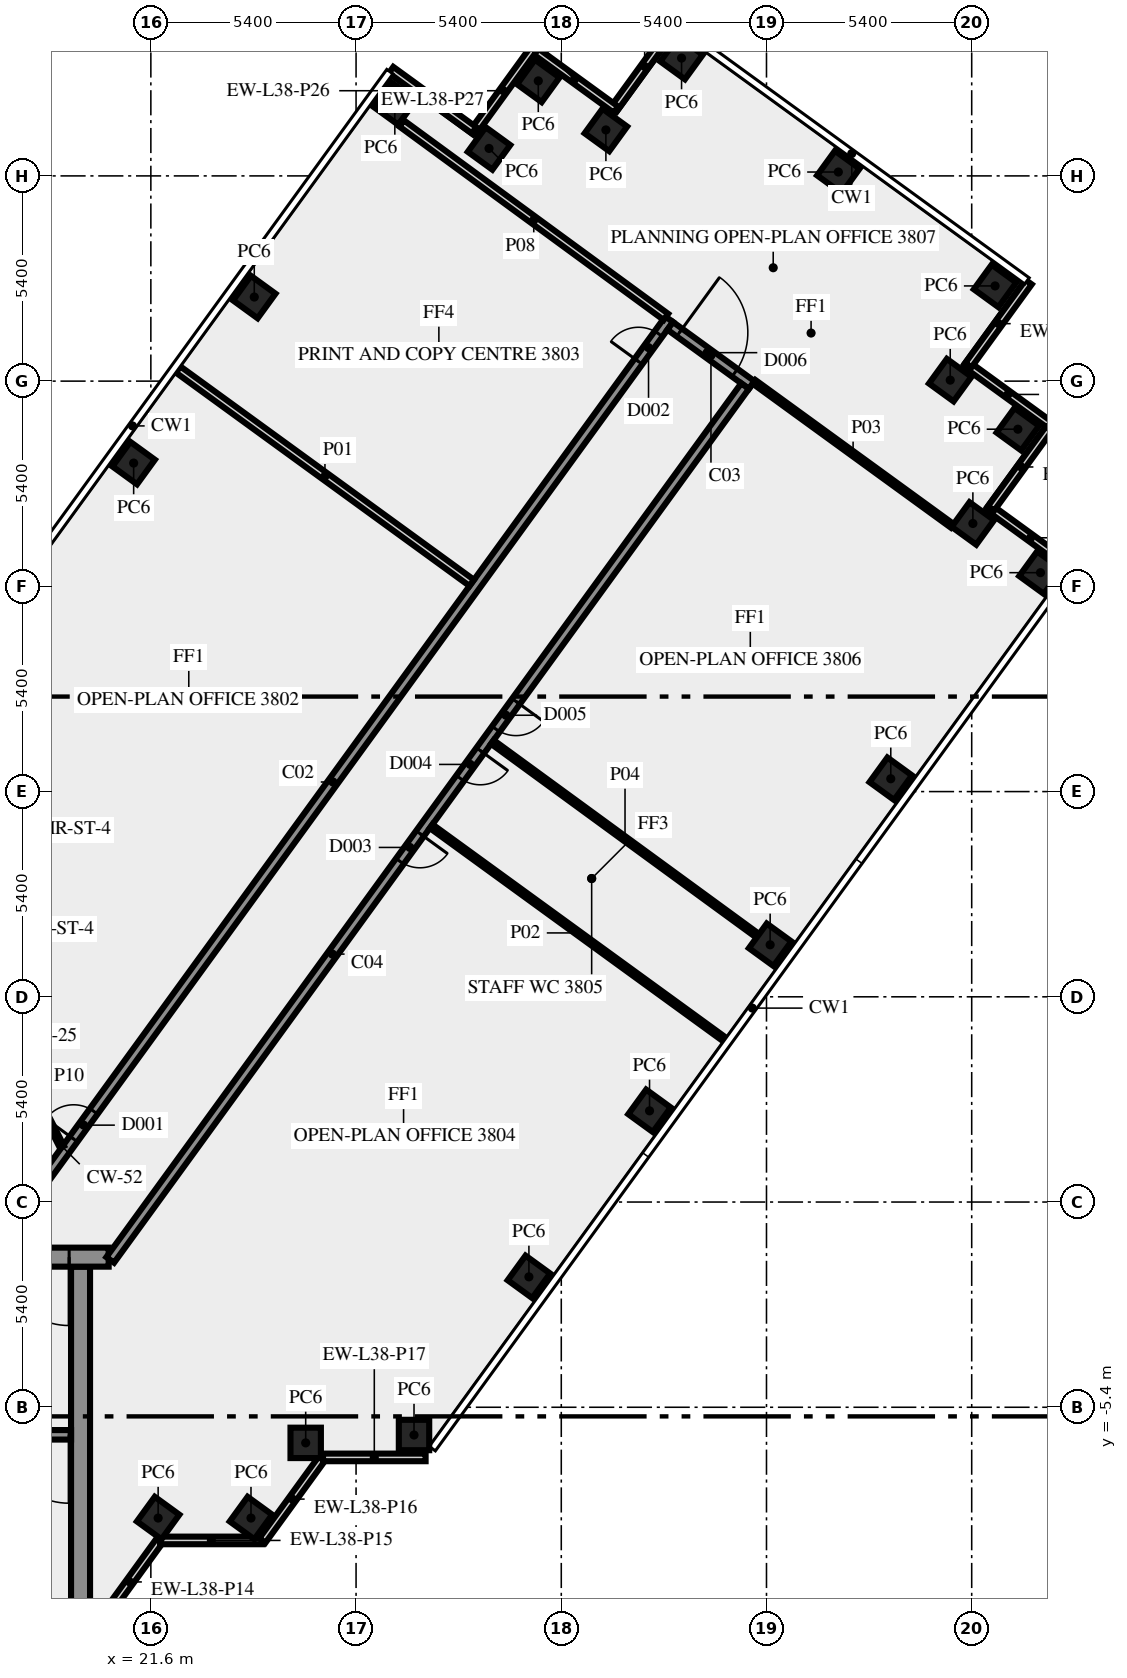
"""IFC4 building model, lengths in metres.
Left out: names, types, materials, properties, quantities, classifications, styles, units other than length and angle.
Written with IfcOpenShell. Run it as: python <this file> out.ifc"""

import sys

from ifc_helpers import new_model, si_unit, direction, frame, frame_2d, origin, origin_2d, place, context, subcontext, project, spatial, rectangle, extrude, element, fill, save


model = new_model("IFC4")
c1 = context("Model", 3, precision=1e-05, world=origin(), true_north=direction((0.0, 1.0)))
c2 = subcontext(c1, "Body", "Model", "MODEL_VIEW")
j1 = project(units=[si_unit("LENGTHUNIT", "METRE"), si_unit("PLANEANGLEUNIT", "RADIAN")], contexts=[c1])
p1 = place(None, origin())
s1 = spatial("IfcSite", under=j1, at=p1, CompositionType="ELEMENT")
p2 = place(p1, origin())
s2 = spatial("IfcBuilding", under=s1, at=p2, CompositionType="ELEMENT")
p3 = place(p2, frame((0.0, 0.0, 164.0)))
s3 = spatial("IfcBuildingStorey", under=s2, at=p3, CompositionType="ELEMENT", Elevation=164.0)
for number, where, z_axis, x_axis in (
    (1, (21.792, -8.315, 0.0), (0.0, 0.0, 1.0), (0.588, 0.809, 0.0)),
    (2, (24.235, -8.315, 0.0), (0.0, 0.0, 1.0), (0.588, 0.809, 0.0)),
    (3, (25.674, -6.337, 0.0), (0.0, 0.0, 1.0), (1.0, 0.0, 0.0)),
    (4, (28.525, -6.13, 0.0), (0.0, 0.0, 1.0), (1.0, 0.0, 0.0)),
    (5, (31.548, -1.969, 0.0), (0.0, 0.0, 1.0), (0.588, 0.809, 0.0)),
    (6, (34.722, 2.4, 0.0), (0.0, 0.0, 1.0), (0.588, 0.809, 0.0)),
    (7, (37.896, 6.769, 0.0), (0.0, 0.0, 1.0), (0.588, 0.809, 0.0)),
    (8, (41.07, 11.137, 0.0), (0.0, 0.0, 1.0), (0.588, 0.809, 0.0)),
    (9, (45.01, 16.56, 0.0), (0.0, 0.0, 1.0), (0.588, 0.809, 0.0)),
    (10, (43.231, 17.854, 0.0), (0.0, 0.0, 1.0), (0.588, 0.809, 0.0)),
    (11, (44.415, 20.335, 0.0), (0.0, 0.0, 1.0), (0.588, 0.809, 0.0)),
    (12, (42.635, 21.626, 0.0), (0.0, 0.0, 1.0), (-0.809, 0.588, 0.0)),
    (13, (43.815, 24.105, 0.0), (0.0, 0.0, 1.0), (-0.809, 0.588, 0.0)),
    (14, (39.691, 27.102, 0.0), (0.0, 0.0, 1.0), (-0.809, 0.588, 0.0)),
    (15, (35.565, 30.1, 0.0), (0.0, 0.0, 1.0), (-0.588, -0.809, 0.0)),
    (16, (33.574, 28.209, 0.0), (0.0, 0.0, 1.0), (-0.809, 0.588, 0.0)),
    (17, (31.795, 29.5, 0.0), (0.0, 0.0, 1.0), (-0.588, -0.809, 0.0)),
    (18, (30.499, 27.723, 0.0), (0.0, 0.0, 1.0), (-0.809, 0.588, 0.0)),
    (19, (28.02, 28.905, 0.0), (0.0, 0.0, 1.0), (-0.809, 0.588, 0.0)),
    (20, (24.321, 23.812, 0.0), (0.0, 0.0, 1.0), (-0.588, -0.809, 0.0)),
    (21, (21.147, 19.444, 0.0), (0.0, 0.0, 1.0), (-0.588, -0.809, 0.0)),
):
    element("IfcColumn", number, at=place(p3, frame(where, z_axis=z_axis, x_axis=x_axis)), inside=s3, PredefinedType="COLUMN", context=c2, shape_type="SweptSolid", body=[
        extrude(rectangle(XDim=0.8, YDim=0.8, at=origin_2d()), origin(), (0.0, 0.0, 1.0), 3.65),
    ])
p4 = place(p3, frame((20.253, -11.083, 0.0), z_axis=(0.0, 0.0, 1.0), x_axis=(0.587766567315, 0.809030569476, 0.0)))
e22 = element("IfcWall", 22, at=p4, inside=s3, PredefinedType="SOLIDWALL", context=c2, shape_type="SweptSolid", body=[
    extrude(rectangle(XDim=2.688, YDim=0.2, at=frame_2d((1.344, 0.0))), origin(), (0.0, 0.0, 1.0), 3.65),
])
p5 = place(p3, frame((21.843, -8.904, 0.0), z_axis=(0.0, 0.0, 1.0), x_axis=(1.0, 0.0, 0.0)))
e23 = element("IfcWall", 23, at=p5, inside=s3, PredefinedType="SOLIDWALL", context=c2, shape_type="SweptSolid", body=[
    extrude(rectangle(XDim=2.7, YDim=0.2, at=frame_2d((1.35, 0.0))), origin(), (0.0, 0.0, 1.0), 3.65),
])
p6 = place(p3, frame((24.533, -8.909, 0.0), z_axis=(0.0, 0.0, 1.0), x_axis=(0.587720002413, 0.809064397168, 0.0)))
e24 = element("IfcWall", 24, at=p6, inside=s3, PredefinedType="SOLIDWALL", context=c2, shape_type="SweptSolid", body=[
    extrude(rectangle(XDim=2.7, YDim=0.2, at=frame_2d((1.35, 0.0))), origin(), (0.0, 0.0, 1.0), 3.65),
])
for number, where, z_axis, x_axis in (
    (25, (26.13, -6.719, 0.0), (0.0, 0.0, 1.0), (1.0, 0.0, 0.0)),
    (26, (45.842, 16.685, 0.0), (0.0, 0.0, 1.0), (-0.809, 0.588, 0.0)),
    (27, (43.709, 18.249, 0.0), (0.0, 0.0, 1.0), (0.588, 0.809, 0.0)),
    (28, (45.245, 20.456, 0.0), (0.0, 0.0, 1.0), (-0.809, 0.588, 0.0)),
    (29, (43.113, 22.02, 0.0), (0.0, 0.0, 1.0), (0.588, 0.809, 0.0)),
    (30, (35.388, 30.97, 0.0), (0.0, 0.0, 1.0), (-0.588, -0.809, 0.0)),
    (31, (33.838, 28.744, 0.0), (0.0, 0.0, 1.0), (-0.809, 0.588, 0.0)),
    (32, (31.67, 30.333, 0.0), (0.0, 0.0, 1.0), (-0.588, -0.809, 0.0)),
    (33, (30.106, 28.2, 0.0), (0.0, 0.0, 1.0), (-0.809, 0.588, 0.0)),
):
    element("IfcWall", number, at=place(p3, frame(where, z_axis=z_axis, x_axis=x_axis)), inside=s3, PredefinedType="SOLIDWALL", context=c2, shape_type="SweptSolid", body=[
        extrude(rectangle(XDim=2.7, YDim=0.2, at=frame_2d((1.35, 0.0))), origin(), (0.0, 0.0, 1.0), 3.65),
    ])
p7 = place(p3, frame((19.75, -10.5, 0.0), z_axis=(0.0, 0.0, 1.0), x_axis=(0.0, 1.0, 0.0)))
e34 = element("IfcWall", 34, at=p7, inside=s3, PredefinedType="SHEAR", context=c2, shape_type="SweptSolid", body=[
    extrude(rectangle(XDim=8.8, YDim=0.5, at=frame_2d((4.4, 0.0))), origin(), (0.0, 0.0, 1.0), 3.65),
])
p8 = place(p3, frame((19.5, -6.125, 0.0), z_axis=(0.0, 0.0, 1.0), x_axis=(-1.0, 0.0, 0.0)))
e35 = element("IfcWall", 35, at=p8, inside=s3, PredefinedType="SHEAR", context=c2, shape_type="SweptSolid", body=[
    extrude(rectangle(XDim=8.05, YDim=0.25, at=frame_2d((4.025, 0.0))), origin(), (0.0, 0.0, 1.0), 3.65),
])
p9 = place(p8, frame((0.05, 0.0, 0.0)))
e36 = element("IfcOpeningElement", 36, at=p9, cuts=e35, PredefinedType="OPENING", context=c2, shape_type="SweptSolid", body=[
    extrude(rectangle(XDim=1.8, YDim=2.1, at=frame_2d((0.9, 1.05))), frame((0.0, 0.135, 0.0), z_axis=(0.0, -1.0, 0.0), x_axis=(1.0, 0.0, 0.0)), (0.0, 0.0, 1.0), 0.27),
])
p10 = place(p3, frame((20.49, -1.45, 0.0), z_axis=(0.0, 0.0, 1.0), x_axis=(-1.0, 0.0, 0.0)))
e37 = element("IfcWall", 37, at=p10, inside=s3, PredefinedType="SHEAR", context=c2, shape_type="SweptSolid", body=[
    extrude(rectangle(XDim=40.98, YDim=0.5, at=frame_2d((20.49, 0.0))), origin(), (0.0, 0.0, 1.0), 3.65),
])
p11 = place(p10, frame((38.14, 0.0, 0.0)))
e38 = element("IfcOpeningElement", 38, at=p11, cuts=e37, PredefinedType="OPENING", context=c2, shape_type="SweptSolid", body=[
    extrude(rectangle(XDim=1.8, YDim=2.1, at=frame_2d((0.9, 1.05))), frame((0.0, 0.26, 0.0), z_axis=(0.0, -1.0, 0.0), x_axis=(1.0, 0.0, 0.0)), (0.0, 0.0, 1.0), 0.52),
])
p12 = place(p10, frame((35.89, 0.0, 0.0)))
e39 = element("IfcOpeningElement", 39, at=p12, cuts=e37, PredefinedType="OPENING", context=c2, shape_type="SweptSolid", body=[
    extrude(rectangle(XDim=0.9, YDim=2.1, at=frame_2d((0.45, 1.05))), frame((0.0, 0.26, 0.0), z_axis=(0.0, -1.0, 0.0), x_axis=(1.0, 0.0, 0.0)), (0.0, 0.0, 1.0), 0.52),
])
p13 = place(p10, frame((32.94, 0.0, 0.0)))
e40 = element("IfcOpeningElement", 40, at=p13, cuts=e37, PredefinedType="OPENING", context=c2, shape_type="SweptSolid", body=[
    extrude(rectangle(XDim=0.9, YDim=2.1, at=frame_2d((0.45, 1.05))), frame((0.0, 0.26, 0.0), z_axis=(0.0, -1.0, 0.0), x_axis=(1.0, 0.0, 0.0)), (0.0, 0.0, 1.0), 0.52),
])
p14 = place(p10, frame((28.802, 0.0, 0.0)))
e41 = element("IfcOpeningElement", 41, at=p14, cuts=e37, PredefinedType="OPENING", context=c2, shape_type="SweptSolid", body=[
    extrude(rectangle(XDim=0.9, YDim=2.1, at=frame_2d((0.45, 1.05))), frame((0.0, 0.26, 0.0), z_axis=(0.0, -1.0, 0.0), x_axis=(1.0, 0.0, 0.0)), (0.0, 0.0, 1.0), 0.52),
])
p15 = place(p10, frame((25.077, 0.0, 0.0)))
e42 = element("IfcOpeningElement", 42, at=p15, cuts=e37, PredefinedType="OPENING", context=c2, shape_type="SweptSolid", body=[
    extrude(rectangle(XDim=0.9, YDim=2.1, at=frame_2d((0.45, 1.05))), frame((0.0, 0.26, 0.0), z_axis=(0.0, -1.0, 0.0), x_axis=(1.0, 0.0, 0.0)), (0.0, 0.0, 1.0), 0.52),
])
p16 = place(p10, frame((21.765, 0.0, 0.0)))
e43 = element("IfcOpeningElement", 43, at=p16, cuts=e37, PredefinedType="OPENING", context=c2, shape_type="SweptSolid", body=[
    extrude(rectangle(XDim=2.0, YDim=2.1, at=frame_2d((1.0, 1.05))), frame((0.0, 0.26, 0.0), z_axis=(0.0, -1.0, 0.0), x_axis=(1.0, 0.0, 0.0)), (0.0, 0.0, 1.0), 0.52),
])
p17 = place(p10, frame((7.14, 0.0, 0.0)))
e44 = element("IfcOpeningElement", 44, at=p17, cuts=e37, PredefinedType="OPENING", context=c2, shape_type="SweptSolid", body=[
    extrude(rectangle(XDim=0.9, YDim=2.1, at=frame_2d((0.45, 1.05))), frame((0.0, 0.26, 0.0), z_axis=(0.0, -1.0, 0.0), x_axis=(1.0, 0.0, 0.0)), (0.0, 0.0, 1.0), 0.52),
])
p18 = place(p10, frame((5.028, 0.0, 0.0)))
e45 = element("IfcOpeningElement", 45, at=p18, cuts=e37, PredefinedType="OPENING", context=c2, shape_type="SweptSolid", body=[
    extrude(rectangle(XDim=0.8, YDim=2.1, at=frame_2d((0.4, 1.05))), frame((0.0, 0.26, 0.0), z_axis=(0.0, -1.0, 0.0), x_axis=(1.0, 0.0, 0.0)), (0.0, 0.0, 1.0), 0.52),
])
p19 = place(p10, frame((3.452, 0.0, 0.0)))
e46 = element("IfcOpeningElement", 46, at=p19, cuts=e37, PredefinedType="OPENING", context=c2, shape_type="SweptSolid", body=[
    extrude(rectangle(XDim=0.8, YDim=2.1, at=frame_2d((0.4, 1.05))), frame((0.0, 0.26, 0.0), z_axis=(0.0, -1.0, 0.0), x_axis=(1.0, 0.0, 0.0)), (0.0, 0.0, 1.0), 0.52),
])
p20 = place(p10, frame((1.04, 0.0, 0.0)))
e47 = element("IfcOpeningElement", 47, at=p20, cuts=e37, PredefinedType="OPENING", context=c2, shape_type="SweptSolid", body=[
    extrude(rectangle(XDim=1.8, YDim=2.1, at=frame_2d((0.9, 1.05))), frame((0.0, 0.26, 0.0), z_axis=(0.0, -1.0, 0.0), x_axis=(1.0, 0.0, 0.0)), (0.0, 0.0, 1.0), 0.52),
])
p21 = place(p3, frame((17.545, -1.125, 0.0), z_axis=(0.0, 0.0, 1.0), x_axis=(0.587786330937, 0.809016210693, 0.0)))
e48 = element("IfcWall", 48, at=p21, inside=s3, PredefinedType="SOLIDWALL", context=c2, shape_type="SweptSolid", body=[
    extrude(rectangle(XDim=30.103, YDim=0.25, at=frame_2d((15.052, 0.0))), origin(), (0.0, 0.0, 1.0), 3.65),
])
p22 = place(p21, frame((3.441, 0.0, 0.0)))
e49 = element("IfcOpeningElement", 49, at=p22, cuts=e48, PredefinedType="OPENING", context=c2, shape_type="SweptSolid", body=[
    extrude(rectangle(XDim=0.9, YDim=2.1, at=frame_2d((0.45, 1.05))), frame((0.0, 0.135, 0.0), z_axis=(0.0, -1.0, 0.0), x_axis=(1.0, 0.0, 0.0)), (0.0, 0.0, 1.0), 0.27),
])
p23 = place(p21, frame((28.729, 0.0, 0.0)))
e50 = element("IfcOpeningElement", 50, at=p23, cuts=e48, PredefinedType="OPENING", context=c2, shape_type="SweptSolid", body=[
    extrude(rectangle(XDim=0.9, YDim=2.1, at=frame_2d((0.45, 1.05))), frame((0.0, 0.135, 0.0), z_axis=(0.0, -1.0, 0.0), x_axis=(1.0, 0.0, 0.0)), (0.0, 0.0, 1.0), 0.27),
])
p24 = place(p3, frame((35.267, 23.054, 0.0), z_axis=(0.0, 0.0, 1.0), x_axis=(0.809038743598, -0.587755315891, 0.0)))
e51 = element("IfcWall", 51, at=p24, inside=s3, PredefinedType="SOLIDWALL", context=c2, shape_type="SweptSolid", body=[
    extrude(rectangle(XDim=2.65, YDim=0.25, at=frame_2d((1.325, 0.0))), origin(), (0.0, 0.0, 1.0), 3.65),
])
p25 = place(p24, frame((0.3, 0.0, 0.0)))
e52 = element("IfcOpeningElement", 52, at=p25, cuts=e51, PredefinedType="OPENING", context=c2, shape_type="SweptSolid", body=[
    extrude(rectangle(XDim=1.8, YDim=2.1, at=frame_2d((0.9, 1.05))), frame((0.0, 0.135, 0.0), z_axis=(0.0, -1.0, 0.0), x_axis=(1.0, 0.0, 0.0)), (0.0, 0.0, 1.0), 0.27),
])
p26 = place(p3, frame((37.236, 21.469, 0.0), z_axis=(0.0, 0.0, 1.0), x_axis=(-0.58778344073, -0.809018310549, 0.0)))
e53 = element("IfcWall", 53, at=p26, inside=s3, PredefinedType="SOLIDWALL", context=c2, shape_type="SweptSolid", body=[
    extrude(rectangle(XDim=28.42, YDim=0.25, at=frame_2d((14.21, 0.0))), origin(), (0.0, 0.0, 1.0), 3.65),
])
p27 = place(p26, frame((14.554, 0.0, 0.0)))
e54 = element("IfcOpeningElement", 54, at=p27, cuts=e53, PredefinedType="OPENING", context=c2, shape_type="SweptSolid", body=[
    extrude(rectangle(XDim=0.9, YDim=2.1, at=frame_2d((0.45, 1.05))), frame((0.0, 0.135, 0.0), z_axis=(0.0, -1.0, 0.0), x_axis=(1.0, 0.0, 0.0)), (0.0, 0.0, 1.0), 0.27),
])
p28 = place(p26, frame((10.255, 0.0, 0.0)))
e55 = element("IfcOpeningElement", 55, at=p28, cuts=e53, PredefinedType="OPENING", context=c2, shape_type="SweptSolid", body=[
    extrude(rectangle(XDim=0.9, YDim=2.1, at=frame_2d((0.45, 1.05))), frame((0.0, 0.135, 0.0), z_axis=(0.0, -1.0, 0.0), x_axis=(1.0, 0.0, 0.0)), (0.0, 0.0, 1.0), 0.27),
])
p29 = place(p26, frame((11.854, 0.0, 0.0)))
e56 = element("IfcOpeningElement", 56, at=p29, cuts=e53, PredefinedType="OPENING", context=c2, shape_type="SweptSolid", body=[
    extrude(rectangle(XDim=0.9, YDim=2.1, at=frame_2d((0.45, 1.05))), frame((0.0, 0.135, 0.0), z_axis=(0.0, -1.0, 0.0), x_axis=(1.0, 0.0, 0.0)), (0.0, 0.0, 1.0), 0.27),
])
p30 = place(p3, frame((30.044, 16.292, 0.0), z_axis=(0.0, 0.0, 1.0), x_axis=(-0.80898585166, 0.587828114175, 0.0)))
e57 = element("IfcWall", 57, at=p30, inside=s3, PredefinedType="SOLIDWALL", context=c2, shape_type="SweptSolid", body=[
    extrude(rectangle(XDim=9.55, YDim=0.2, at=frame_2d((4.775, 0.0))), origin(), (0.0, 0.0, 1.0), 2.85),
])
p31 = place(p3, frame((36.702, 4.274, 0.0), z_axis=(0.0, 0.0, 1.0), x_axis=(-0.808998008689, 0.58781138296, 0.0)))
e58 = element("IfcWall", 58, at=p31, inside=s3, PredefinedType="PARTITIONING", context=c2, shape_type="SweptSolid", body=[
    extrude(rectangle(XDim=9.55, YDim=0.12, at=frame_2d((4.775, 0.0))), origin(), (0.0, 0.0, 1.0), 2.85),
])
p32 = place(p3, frame((42.686, 17.794, 0.0), z_axis=(0.0, 0.0, 1.0), x_axis=(-0.809017755079, 0.587784205272, 0.0)))
e59 = element("IfcWall", 59, at=p32, inside=s3, PredefinedType="PARTITIONING", context=c2, shape_type="SweptSolid", body=[
    extrude(rectangle(XDim=6.445, YDim=0.12, at=frame_2d((3.222, 0.0))), origin(), (0.0, 0.0, 1.0), 3.65),
])
p33 = place(p3, frame((30.587, 12.104, 0.0), z_axis=(0.0, 0.0, 1.0), x_axis=(0.807584089733, -0.589752437902, 0.0)))
e60 = element("IfcWall", 60, at=p33, inside=s3, PredefinedType="PARTITIONING", context=c2, shape_type="SweptSolid", body=[
    extrude(rectangle(XDim=8.645, YDim=0.12, at=frame_2d((4.322, 0.0))), origin(), (0.0, 0.0, 1.0), 3.65),
])
p34 = place(p3, frame((28.198, 28.381, 0.0), z_axis=(0.0, 0.0, 1.0), x_axis=(0.806977317905, -0.590582431492, 0.0)))
e61 = element("IfcWall", 61, at=p34, inside=s3, PredefinedType="SOLIDWALL", context=c2, shape_type="SweptSolid", body=[
    extrude(rectangle(XDim=8.62, YDim=0.2, at=frame_2d((4.31, 0.0))), origin(), (0.0, 0.0, 1.0), 3.65),
])
p35 = place(p3, frame((18.0, 3.925, 0.0), z_axis=(0.0, 0.0, 1.0), x_axis=(0.453950796792, -0.891026752736, 0.0)))
e62 = element("IfcWall", 62, at=p35, inside=s3, PredefinedType="PARTITIONING", context=c2, shape_type="SweptSolid", body=[
    extrude(rectangle(XDim=2.778, YDim=0.12, at=frame_2d((1.389, 0.0))), origin(), (0.0, 0.0, 1.0), 3.65),
])
p36 = place(p9, origin())
e63 = element("IfcDoor", 63, at=p36, inside=s3, OperationType="DOUBLE_DOOR_SINGLE_SWING", PredefinedType="DOOR", context=c2, shape_type="SweptSolid", body=[
    extrude(rectangle(XDim=1.8, YDim=2.1, at=frame_2d((0.9, 1.05))), frame((0.0, 0.025, 0.0), z_axis=(0.0, -1.0, 0.0), x_axis=(1.0, 0.0, 0.0)), (0.0, 0.0, 1.0), 0.05),
])
fill(e36, e63)
p37 = place(p20, origin())
e64 = element("IfcDoor", 64, at=p37, inside=s3, OperationType="DOUBLE_DOOR_SINGLE_SWING", PredefinedType="DOOR", context=c2, shape_type="SweptSolid", body=[
    extrude(rectangle(XDim=1.8, YDim=2.1, at=frame_2d((0.9, 1.05))), frame((0.0, 0.025, 0.0), z_axis=(0.0, -1.0, 0.0), x_axis=(1.0, 0.0, 0.0)), (0.0, 0.0, 1.0), 0.05),
])
fill(e47, e64)
p38 = place(p22, origin())
e65 = element("IfcDoor", 65, at=p38, inside=s3, OperationType="SINGLE_SWING_LEFT", PredefinedType="DOOR", context=c2, shape_type="SweptSolid", body=[
    extrude(rectangle(XDim=0.9, YDim=2.1, at=frame_2d((0.45, 1.05))), frame((0.0, 0.025, 0.0), z_axis=(0.0, -1.0, 0.0), x_axis=(1.0, 0.0, 0.0)), (0.0, 0.0, 1.0), 0.05),
])
fill(e49, e65)
p39 = place(p27, origin())
e66 = element("IfcDoor", 66, at=p39, inside=s3, OperationType="SINGLE_SWING_LEFT", PredefinedType="DOOR", context=c2, shape_type="SweptSolid", body=[
    extrude(rectangle(XDim=0.9, YDim=2.1, at=frame_2d((0.45, 1.05))), frame((0.0, 0.025, 0.0), z_axis=(0.0, -1.0, 0.0), x_axis=(1.0, 0.0, 0.0)), (0.0, 0.0, 1.0), 0.05),
])
fill(e54, e66)
p40 = place(p28, origin())
e67 = element("IfcDoor", 67, at=p40, inside=s3, OperationType="SINGLE_SWING_RIGHT", PredefinedType="DOOR", context=c2, shape_type="SweptSolid", body=[
    extrude(rectangle(XDim=0.9, YDim=2.1, at=frame_2d((0.45, 1.05))), frame((0.0, 0.025, 0.0), z_axis=(0.0, -1.0, 0.0), x_axis=(1.0, 0.0, 0.0)), (0.0, 0.0, 1.0), 0.05),
])
fill(e55, e67)
p41 = place(p25, origin())
e68 = element("IfcDoor", 68, at=p41, inside=s3, OperationType="DOUBLE_DOOR_SINGLE_SWING", PredefinedType="DOOR", context=c2, shape_type="SweptSolid", body=[
    extrude(rectangle(XDim=1.8, YDim=2.1, at=frame_2d((0.9, 1.05))), frame((0.0, 0.025, 0.0), z_axis=(0.0, -1.0, 0.0), x_axis=(1.0, 0.0, 0.0)), (0.0, 0.0, 1.0), 0.05),
])
fill(e52, e68)
p42 = place(p23, origin())
e69 = element("IfcDoor", 69, at=p42, inside=s3, OperationType="SINGLE_SWING_RIGHT", PredefinedType="DOOR", context=c2, shape_type="SweptSolid", body=[
    extrude(rectangle(XDim=0.9, YDim=2.1, at=frame_2d((0.45, 1.05))), frame((0.0, 0.025, 0.0), z_axis=(0.0, -1.0, 0.0), x_axis=(1.0, 0.0, 0.0)), (0.0, 0.0, 1.0), 0.05),
])
fill(e50, e69)
p43 = place(p29, origin())
e70 = element("IfcDoor", 70, at=p43, inside=s3, OperationType="SINGLE_SWING_LEFT", PredefinedType="DOOR", context=c2, shape_type="SweptSolid", body=[
    extrude(rectangle(XDim=0.9, YDim=2.1, at=frame_2d((0.45, 1.05))), frame((0.0, 0.025, 0.0), z_axis=(0.0, -1.0, 0.0), x_axis=(1.0, 0.0, 0.0)), (0.0, 0.0, 1.0), 0.05),
])
fill(e56, e70)
save(model, sys.argv[1])
